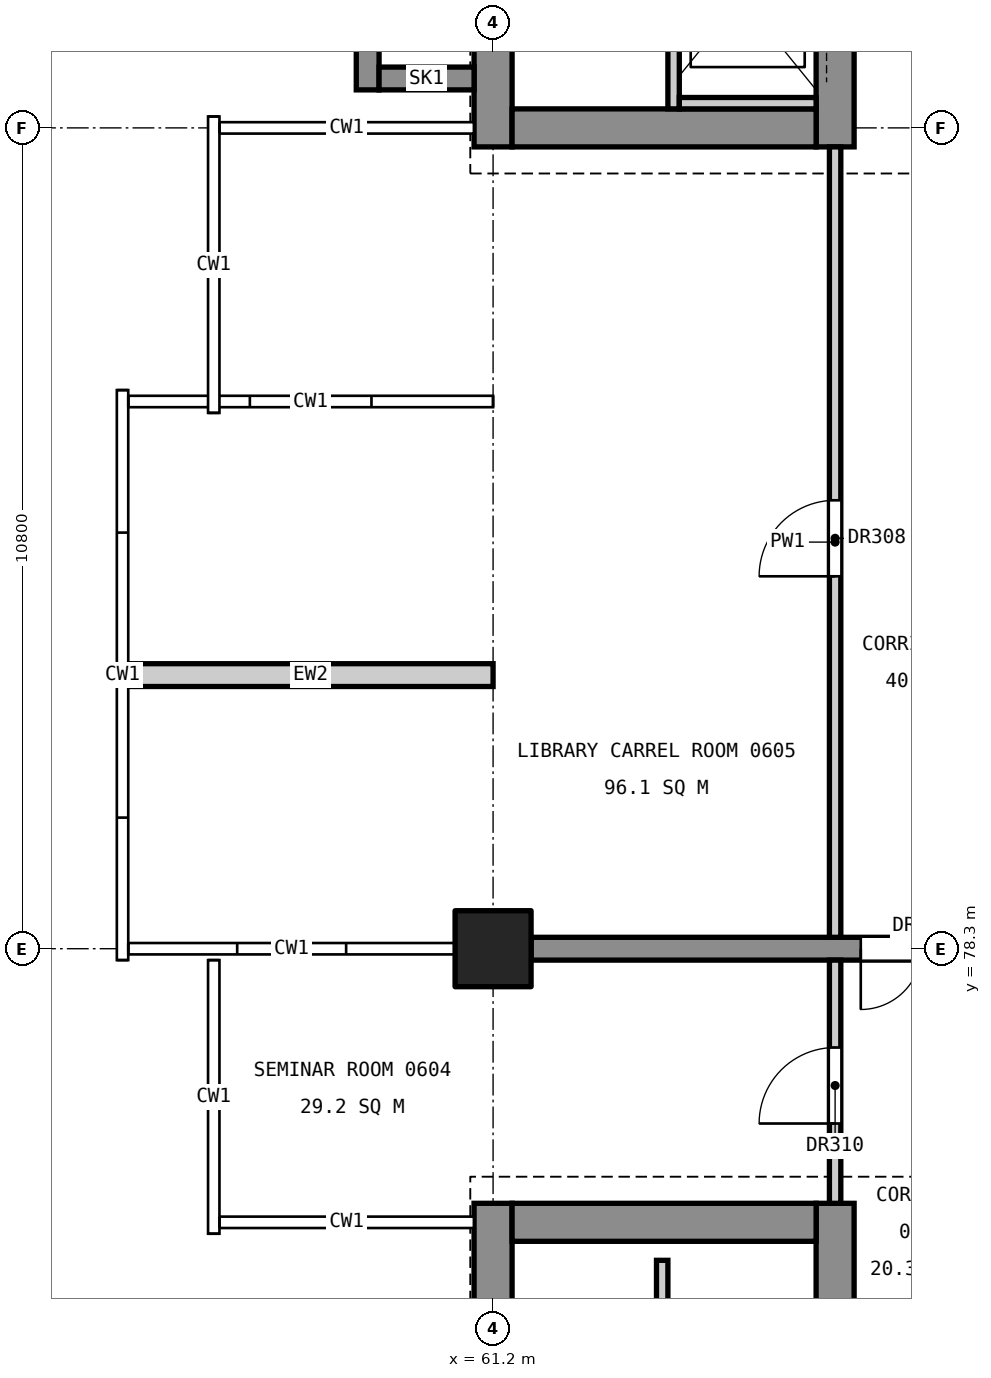
"""IFC4 building model, lengths in metres.
Left out: names, types, materials, properties, quantities, classifications, styles, units other than length and angle.
Written with IfcOpenShell. Run it as: python <this file> out.ifc"""

import sys

from ifc_helpers import new_model, si_unit, direction, frame, frame_2d, origin, origin_2d, place, context, subcontext, project, spatial, rectangle, extrude, element, fill, save


model = new_model("IFC4")
c1 = context("Model", 3, precision=1e-05, world=origin(), true_north=direction((0.0, 1.0)))
c2 = subcontext(c1, "Body", "Model", "MODEL_VIEW")
j1 = project(units=[si_unit("LENGTHUNIT", "METRE"), si_unit("PLANEANGLEUNIT", "RADIAN")], contexts=[c1])
p1 = place(None, origin())
s1 = spatial("IfcSite", under=j1, at=p1, CompositionType="ELEMENT")
p2 = place(p1, origin())
s2 = spatial("IfcBuilding", under=s1, at=p2, CompositionType="ELEMENT")
p3 = place(p2, frame((0.0, 0.0, 31.8)))
s3 = spatial("IfcBuildingStorey", under=s2, at=p3, CompositionType="ELEMENT", Elevation=31.8)
p4 = place(p3, frame((61.2, 78.3, 0.0), z_axis=(0.0, 0.0, 1.0), x_axis=(1.0, 0.0, 0.0)))
e1 = element("IfcColumn", 1, at=p4, inside=s3, PredefinedType="COLUMN", context=c2, shape_type="SweptSolid", body=[
    extrude(rectangle(XDim=1.0, YDim=1.0, at=origin_2d()), origin(), (0.0, 0.0, 1.0), 4.8),
])
p5 = place(p3, frame((61.2, 60.05, 0.0), z_axis=(0.0, 0.0, 1.0), x_axis=(0.0, 1.0, 0.0)))
e2 = element("IfcWall", 2, at=p5, inside=s3, PredefinedType="SHEAR", context=c2, shape_type="SweptSolid", body=[
    extrude(rectangle(XDim=14.9, YDim=0.5, at=frame_2d((7.45, 0.0))), origin(), (0.0, 0.0, 1.0), 4.55),
])
p6 = place(p5, frame((6.16, 0.0, 3.4)))
e3 = element("IfcOpeningElement", 3, at=p6, cuts=e2, PredefinedType="OPENING", context=c2, shape_type="SweptSolid", body=[
    extrude(rectangle(XDim=1.2, YDim=0.9, at=frame_2d((0.6, 0.45))), frame((0.0, 0.26, 0.0), z_axis=(0.0, -1.0, 0.0), x_axis=(1.0, 0.0, 0.0)), (0.0, 0.0, 1.0), 0.52),
])
p7 = place(p3, frame((65.7, 60.05, 0.0), z_axis=(0.0, 0.0, 1.0), x_axis=(0.0, 1.0, 0.0)))
e4 = element("IfcWall", 4, at=p7, inside=s3, PredefinedType="SHEAR", context=c2, shape_type="SweptSolid", body=[
    extrude(rectangle(XDim=14.9, YDim=0.5, at=frame_2d((7.45, 0.0))), origin(), (0.0, 0.0, 1.0), 4.55),
])
p8 = place(p7, frame((0.55, 0.0, 0.0)))
e5 = element("IfcOpeningElement", 5, at=p8, cuts=e4, PredefinedType="OPENING", context=c2, shape_type="SweptSolid", body=[
    extrude(rectangle(XDim=1.4, YDim=2.1, at=frame_2d((0.7, 1.05))), frame((0.0, 0.26, 0.0), z_axis=(0.0, -1.0, 0.0), x_axis=(1.0, 0.0, 0.0)), (0.0, 0.0, 1.0), 0.52),
])
p9 = place(p7, frame((8.85, 0.0, 0.0)))
e6 = element("IfcOpeningElement", 6, at=p9, cuts=e4, PredefinedType="OPENING", context=c2, shape_type="SweptSolid", body=[
    extrude(rectangle(XDim=1.1, YDim=2.1, at=frame_2d((0.55, 1.05))), frame((0.0, 0.26, 0.0), z_axis=(0.0, -1.0, 0.0), x_axis=(1.0, 0.0, 0.0)), (0.0, 0.0, 1.0), 0.52),
])
p10 = place(p7, frame((11.4, 0.0, 0.0)))
e7 = element("IfcOpeningElement", 7, at=p10, cuts=e4, PredefinedType="OPENING", context=c2, shape_type="SweptSolid", body=[
    extrude(rectangle(XDim=1.1, YDim=2.1, at=frame_2d((0.55, 1.05))), frame((0.0, 0.26, 0.0), z_axis=(0.0, -1.0, 0.0), x_axis=(1.0, 0.0, 0.0)), (0.0, 0.0, 1.0), 0.52),
])
p11 = place(p3, frame((61.45, 74.7, 0.0), z_axis=(0.0, 0.0, 1.0), x_axis=(1.0, 0.0, 0.0)))
e8 = element("IfcWall", 8, at=p11, inside=s3, PredefinedType="SHEAR", context=c2, shape_type="SweptSolid", body=[
    extrude(rectangle(XDim=4.0, YDim=0.5, at=frame_2d((2.0, 0.0))), origin(), (0.0, 0.0, 1.0), 4.55),
])
p12 = place(p3, frame((61.2, 88.85, 0.0), z_axis=(0.0, 0.0, 1.0), x_axis=(0.0, 1.0, 0.0)))
e9 = element("IfcWall", 9, at=p12, inside=s3, PredefinedType="SHEAR", context=c2, shape_type="SweptSolid", body=[
    extrude(rectangle(XDim=11.3, YDim=0.5, at=frame_2d((5.65, 0.0))), origin(), (0.0, 0.0, 1.0), 4.55),
])
p13 = place(p12, frame((3.94, 0.0, 3.4)))
e10 = element("IfcOpeningElement", 10, at=p13, cuts=e9, PredefinedType="OPENING", context=c2, shape_type="SweptSolid", body=[
    extrude(rectangle(XDim=1.2, YDim=0.9, at=frame_2d((0.6, 0.45))), frame((0.0, 0.26, 0.0), z_axis=(0.0, -1.0, 0.0), x_axis=(1.0, 0.0, 0.0)), (0.0, 0.0, 1.0), 0.52),
])
p14 = place(p3, frame((65.7, 88.85, 0.0), z_axis=(0.0, 0.0, 1.0), x_axis=(0.0, 1.0, 0.0)))
e11 = element("IfcWall", 11, at=p14, inside=s3, PredefinedType="SHEAR", context=c2, shape_type="SweptSolid", body=[
    extrude(rectangle(XDim=11.3, YDim=0.5, at=frame_2d((5.65, 0.0))), origin(), (0.0, 0.0, 1.0), 4.55),
])
p15 = place(p14, frame((9.35, 0.0, 0.0)))
e12 = element("IfcOpeningElement", 12, at=p15, cuts=e11, PredefinedType="OPENING", context=c2, shape_type="SweptSolid", body=[
    extrude(rectangle(XDim=1.4, YDim=2.1, at=frame_2d((0.7, 1.05))), frame((0.0, 0.26, 0.0), z_axis=(0.0, -1.0, 0.0), x_axis=(1.0, 0.0, 0.0)), (0.0, 0.0, 1.0), 0.52),
])
p16 = place(p14, frame((1.4, 0.0, 0.0)))
e13 = element("IfcOpeningElement", 13, at=p16, cuts=e11, PredefinedType="OPENING", context=c2, shape_type="SweptSolid", body=[
    extrude(rectangle(XDim=1.1, YDim=2.1, at=frame_2d((0.55, 1.05))), frame((0.0, 0.26, 0.0), z_axis=(0.0, -1.0, 0.0), x_axis=(1.0, 0.0, 0.0)), (0.0, 0.0, 1.0), 0.52),
])
p17 = place(p3, frame((61.45, 89.1, 0.0), z_axis=(0.0, 0.0, 1.0), x_axis=(1.0, 0.0, 0.0)))
e14 = element("IfcWall", 14, at=p17, inside=s3, PredefinedType="SHEAR", context=c2, shape_type="SweptSolid", body=[
    extrude(rectangle(XDim=4.0, YDim=0.5, at=frame_2d((2.0, 0.0))), origin(), (0.0, 0.0, 1.0), 4.55),
])
p18 = place(p3, frame((59.55, 89.6, 0.0), z_axis=(0.0, 0.0, 1.0), x_axis=(0.0, 1.0, 0.0)))
e15 = element("IfcWall", 15, at=p18, inside=s3, PredefinedType="SHEAR", context=c2, shape_type="SweptSolid", body=[
    extrude(rectangle(XDim=2.4, YDim=0.3, at=frame_2d((1.2, 0.0))), origin(), (0.0, 0.0, 1.0), 4.8),
])
p19 = place(p3, frame((60.95, 89.75, 0.0), z_axis=(0.0, 0.0, 1.0), x_axis=(-1.0, 0.0, 0.0)))
e16 = element("IfcWall", 16, at=p19, inside=s3, PredefinedType="SHEAR", context=c2, shape_type="SweptSolid", body=[
    extrude(rectangle(XDim=1.25, YDim=0.3, at=frame_2d((0.625, 0.0))), origin(), (0.0, 0.0, 1.0), 4.8),
])
p20 = place(p3, frame((61.7, 78.3, 0.0), z_axis=(0.0, 0.0, 1.0), x_axis=(1.0, 0.0, 0.0)))
e17 = element("IfcWall", 17, at=p20, inside=s3, PredefinedType="SHEAR", context=c2, shape_type="SweptSolid", body=[
    extrude(rectangle(XDim=6.2, YDim=0.3, at=frame_2d((3.1, 0.0))), origin(), (0.0, 0.0, 1.0), 4.55),
])
p21 = place(p20, frame((4.337, 0.0, 0.0)))
e18 = element("IfcOpeningElement", 18, at=p21, cuts=e17, PredefinedType="OPENING", context=c2, shape_type="SweptSolid", body=[
    extrude(rectangle(XDim=1.6, YDim=2.1, at=frame_2d((0.8, 1.05))), frame((0.0, 0.16, 0.0), z_axis=(0.0, -1.0, 0.0), x_axis=(1.0, 0.0, 0.0)), (0.0, 0.0, 1.0), 0.32),
])
p22 = place(p3, frame((63.575, 92.0, 0.0), z_axis=(0.0, 0.0, 1.0), x_axis=(0.0, -1.0, 0.0)))
e19 = element("IfcWall", 19, at=p22, inside=s3, PredefinedType="SOLIDWALL", context=c2, shape_type="SweptSolid", body=[
    extrude(rectangle(XDim=2.65, YDim=0.15, at=frame_2d((1.325, 0.0))), origin(), (0.0, 0.0, 1.0), 4.8),
])
p23 = place(p3, frame((63.65, 89.425, 0.0), z_axis=(0.0, 0.0, 1.0), x_axis=(1.0, 0.0, 0.0)))
e20 = element("IfcWall", 20, at=p23, inside=s3, PredefinedType="SOLIDWALL", context=c2, shape_type="SweptSolid", body=[
    extrude(rectangle(XDim=1.8, YDim=0.15, at=frame_2d((0.9, 0.0))), origin(), (0.0, 0.0, 1.0), 4.8),
])
p24 = place(p3, frame((63.425, 73.3, 0.0), z_axis=(0.0, 0.0, 1.0), x_axis=(0.0, 1.0, 0.0)))
e21 = element("IfcWall", 21, at=p24, inside=s3, PredefinedType="SOLIDWALL", context=c2, shape_type="SweptSolid", body=[
    extrude(rectangle(XDim=0.9, YDim=0.15, at=frame_2d((0.45, 0.0))), origin(), (0.0, 0.0, 1.0), 4.8),
])
p25 = place(p3, frame((56.4, 81.9, 0.0), z_axis=(0.0, 0.0, 1.0), x_axis=(1.0, 0.0, 0.0)))
e22 = element("IfcWall", 22, at=p25, inside=s3, PredefinedType="STANDARD", context=c2, shape_type="SweptSolid", body=[
    extrude(rectangle(XDim=4.8, YDim=0.3, at=frame_2d((2.4, 0.0))), origin(), (0.0, 0.0, 1.0), 3.65),
])
p26 = place(p3, frame((65.7, 74.95, 0.0), z_axis=(0.0, 0.0, 1.0), x_axis=(0.0, 1.0, 0.0)))
e23 = element("IfcWall", 23, at=p26, inside=s3, PredefinedType="PARTITIONING", context=c2, shape_type="SweptSolid", body=[
    extrude(rectangle(XDim=3.2, YDim=0.15, at=frame_2d((1.6, 0.0))), origin(), (0.0, 0.0, 1.0), 3.55),
])
p27 = place(p26, frame((1.05, 0.0, 0.0)))
e24 = element("IfcOpeningElement", 24, at=p27, cuts=e23, PredefinedType="OPENING", context=c2, shape_type="SweptSolid", body=[
    extrude(rectangle(XDim=1.0, YDim=2.1, at=frame_2d((0.5, 1.05))), frame((0.0, 0.085, 0.0), z_axis=(0.0, -1.0, 0.0), x_axis=(1.0, 0.0, 0.0)), (0.0, 0.0, 1.0), 0.17),
])
p28 = place(p3, frame((65.7, 78.45, 0.0), z_axis=(0.0, 0.0, 1.0), x_axis=(0.0, 1.0, 0.0)))
e25 = element("IfcWall", 25, at=p28, inside=s3, PredefinedType="PARTITIONING", context=c2, shape_type="SweptSolid", body=[
    extrude(rectangle(XDim=10.4, YDim=0.15, at=frame_2d((5.2, 0.0))), origin(), (0.0, 0.0, 1.0), 3.55),
])
p29 = place(p28, frame((4.75, 0.0, 0.0)))
e26 = element("IfcOpeningElement", 26, at=p29, cuts=e25, PredefinedType="OPENING", context=c2, shape_type="SweptSolid", body=[
    extrude(rectangle(XDim=1.0, YDim=2.1, at=frame_2d((0.5, 1.05))), frame((0.0, 0.085, 0.0), z_axis=(0.0, -1.0, 0.0), x_axis=(1.0, 0.0, 0.0)), (0.0, 0.0, 1.0), 0.17),
])
p30 = place(p29, origin())
e27 = element("IfcDoor", 27, at=p30, inside=s3, OperationType="SINGLE_SWING_LEFT", PredefinedType="DOOR", context=c2, shape_type="SweptSolid", body=[
    extrude(rectangle(XDim=1.0, YDim=2.1, at=frame_2d((0.5, 1.05))), frame((0.0, 0.025, 0.0), z_axis=(0.0, -1.0, 0.0), x_axis=(1.0, 0.0, 0.0)), (0.0, 0.0, 1.0), 0.05),
])
fill(e26, e27)
p31 = place(p27, origin())
e28 = element("IfcDoor", 28, at=p31, inside=s3, OperationType="SINGLE_SWING_LEFT", PredefinedType="DOOR", context=c2, shape_type="SweptSolid", body=[
    extrude(rectangle(XDim=1.0, YDim=2.1, at=frame_2d((0.5, 1.05))), frame((0.0, 0.025, 0.0), z_axis=(0.0, -1.0, 0.0), x_axis=(1.0, 0.0, 0.0)), (0.0, 0.0, 1.0), 0.05),
])
fill(e24, e28)
p32 = place(p21, frame((1.6, 0.0, 0.0), z_axis=(0.0, 0.0, 1.0), x_axis=(-1.0, 0.0, 0.0)))
e29 = element("IfcDoor", 29, at=p32, inside=s3, OperationType="DOUBLE_DOOR_SINGLE_SWING", PredefinedType="DOOR", context=c2, shape_type="SweptSolid", body=[
    extrude(rectangle(XDim=1.6, YDim=2.1, at=frame_2d((0.8, 1.05))), frame((0.0, 0.025, 0.0), z_axis=(0.0, -1.0, 0.0), x_axis=(1.0, 0.0, 0.0)), (0.0, 0.0, 1.0), 0.05),
])
fill(e18, e29)
save(model, sys.argv[1])
